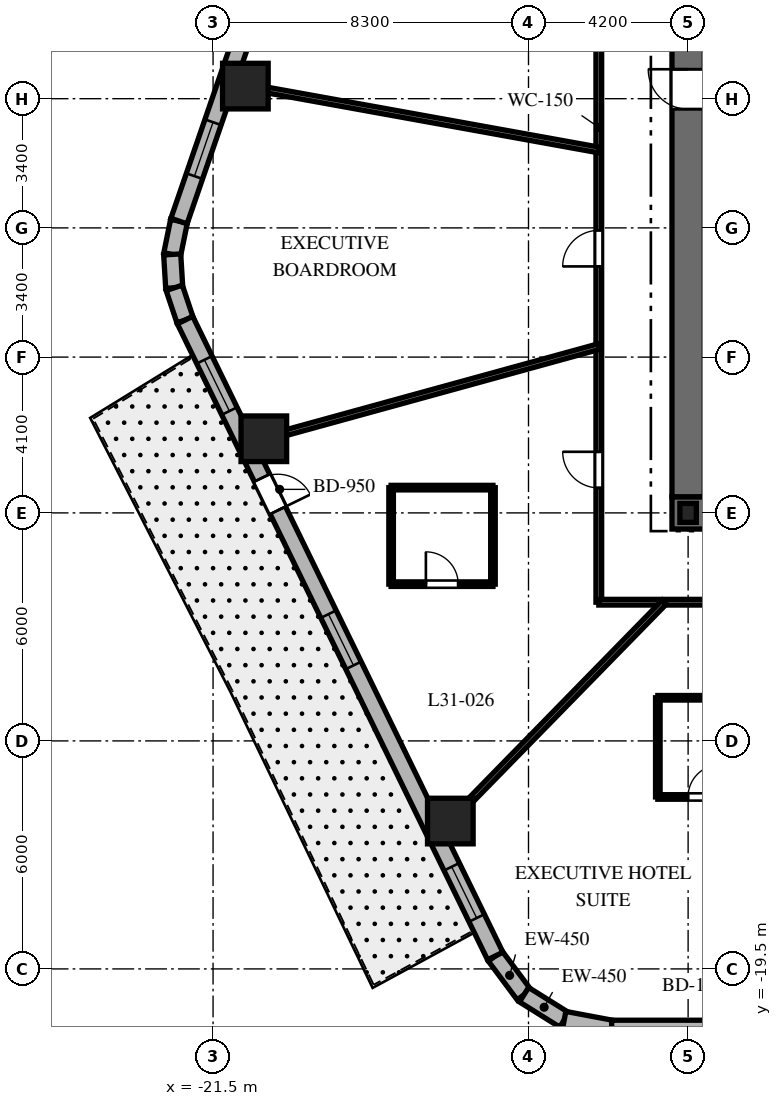
"""IFC4 building model, lengths in metres.
Left out: names, types, materials, properties, quantities, classifications, styles, units other than length and angle.
Written with IfcOpenShell. Run it as: python <this file> out.ifc"""

import sys

from ifc_helpers import new_model, si_unit, direction, frame, frame_2d, origin, origin_2d, place, context, subcontext, project, spatial, rectangle, i_section, extrude, element, fill, save


model = new_model("IFC4")
c1 = context("Model", 3, precision=1e-05, world=origin(), true_north=direction((0.0, 1.0)))
c2 = subcontext(c1, "Body", "Model", "MODEL_VIEW")
j1 = project(units=[si_unit("LENGTHUNIT", "METRE"), si_unit("PLANEANGLEUNIT", "RADIAN")], contexts=[c1])
p1 = place(None, origin())
s1 = spatial("IfcSite", under=j1, at=p1, CompositionType="ELEMENT")
p2 = place(p1, origin())
s2 = spatial("IfcBuilding", under=s1, at=p2, CompositionType="ELEMENT")
p3 = place(p2, frame((0.0, 0.0, 128.4)))
s3 = spatial("IfcBuildingStorey", under=s2, at=p3, CompositionType="ELEMENT", Elevation=128.4)
p4 = place(p3, frame((-9.425, -7.5, 0.0), z_axis=(0.0, 0.0, 1.0), x_axis=(1.0, 0.0, 0.0)))
e1 = element("IfcWall", 1, at=p4, inside=s3, PredefinedType="SHEAR", context=c2, shape_type="SweptSolid", body=[
    extrude(rectangle(XDim=18.85, YDim=0.85, at=frame_2d((9.425, 0.0))), origin(), (0.0, 0.0, 1.0), 3.7),
])
p5 = place(p4, frame((9.475, 0.0, 0.0)))
e2 = element("IfcOpeningElement", 2, at=p5, cuts=e1, PredefinedType="OPENING", context=c2, shape_type="SweptSolid", body=[
    extrude(rectangle(XDim=1.0, YDim=2.15, at=frame_2d((0.5, 1.075))), frame((0.0, 0.435, 0.0), z_axis=(0.0, -1.0, 0.0), x_axis=(1.0, 0.0, 0.0)), (0.0, 0.0, 1.0), 0.87),
])
p6 = place(p3, frame((-9.0, -7.075, 0.0), z_axis=(0.0, 0.0, 1.0), x_axis=(0.0, 1.0, 0.0)))
e3 = element("IfcWall", 3, at=p6, inside=s3, PredefinedType="SHEAR", context=c2, shape_type="SweptSolid", body=[
    extrude(rectangle(XDim=14.15, YDim=0.85, at=frame_2d((7.075, 0.0))), origin(), (0.0, 0.0, 1.0), 3.7),
])
p7 = place(p6, frame((10.2, 0.0, 0.0)))
e4 = element("IfcOpeningElement", 4, at=p7, cuts=e3, PredefinedType="OPENING", context=c2, shape_type="SweptSolid", body=[
    extrude(rectangle(XDim=1.05, YDim=2.15, at=frame_2d((0.525, 1.075))), frame((0.0, 0.435, 0.0), z_axis=(0.0, -1.0, 0.0), x_axis=(1.0, 0.0, 0.0)), (0.0, 0.0, 1.0), 0.87),
])
p8 = place(p3, frame((-9.0, -7.5, 0.0), z_axis=(0.0, 0.0, 1.0), x_axis=(1.0, 0.0, 0.0)))
e5 = element("IfcColumn", 5, at=p8, inside=s3, PredefinedType="COLUMN", context=c2, shape_type="SweptSolid", body=[
    extrude(i_section(OverallWidth=0.432, OverallDepth=0.498, WebThickness=0.056, FlangeThickness=0.089, at=origin_2d()), origin(), (0.0, 0.0, 1.0), 3.7),
])
for number, where, z_axis, x_axis in (
    (6, (-20.65, 3.731, 0.0), (0.0, 0.0, 1.0), (1.0, 0.0, 0.0)),
    (7, (-20.164, -5.549, 0.0), (0.0, 0.0, 1.0), (1.0, 0.0, 0.0)),
    (8, (-15.257, -15.609, 0.0), (0.0, 0.0, 1.0), (1.0, 0.0, 0.0)),
):
    element("IfcColumn", number, at=place(p3, frame(where, z_axis=z_axis, x_axis=x_axis)), inside=s3, PredefinedType="COLUMN", context=c2, shape_type="SweptSolid", body=[
        extrude(rectangle(XDim=1.2, YDim=1.2, at=origin_2d()), origin(), (0.0, 0.0, 1.0), 3.7),
    ])
p9 = place(p3, frame((-14.076, -19.161, 0.0), z_axis=(0.0, 0.0, 1.0), x_axis=(0.597226657159, -0.802072515412, 0.0)))
e9 = element("IfcWall", 9, at=p9, inside=s3, PredefinedType="SOLIDWALL", context=c2, shape_type="SweptSolid", body=[
    extrude(rectangle(XDim=1.269, YDim=0.45, at=frame_2d((0.635, 0.0))), origin(), (0.0, 0.0, 1.0), 3.4),
])
p10 = place(p3, frame((-13.318, -20.179, 0.0), z_axis=(0.0, 0.0, 1.0), x_axis=(0.848031272749, -0.529946186362, 0.0)))
e10 = element("IfcWall", 10, at=p10, inside=s3, PredefinedType="SOLIDWALL", context=c2, shape_type="SweptSolid", body=[
    extrude(rectangle(XDim=1.248, YDim=0.45, at=frame_2d((0.624, 0.0))), origin(), (0.0, 0.0, 1.0), 3.4),
])
p11 = place(p3, frame((-12.259, -20.84, 0.0), z_axis=(0.0, 0.0, 1.0), x_axis=(0.982730354425, -0.185043374624, 0.0)))
e11 = element("IfcWall", 11, at=p11, inside=s3, PredefinedType="SOLIDWALL", context=c2, shape_type="SweptSolid", body=[
    extrude(rectangle(XDim=1.269, YDim=0.45, at=frame_2d((0.635, 0.0))), origin(), (0.0, 0.0, 1.0), 3.4),
])
p12 = place(p3, frame((-22.397, 0.179, 0.0), z_axis=(0.0, 0.0, 1.0), x_axis=(-0.199313589404, -0.979935759669, 0.0)))
e12 = element("IfcWall", 12, at=p12, inside=s3, PredefinedType="SOLIDWALL", context=c2, shape_type="SweptSolid", body=[
    extrude(rectangle(XDim=0.896, YDim=0.45, at=frame_2d((0.448, 0.0))), origin(), (0.0, 0.0, 1.0), 3.4),
])
p13 = place(p3, frame((-22.575, -0.698, 0.0), z_axis=(0.0, 0.0, 1.0), x_axis=(0.060980441946, -0.998138961117, 0.0)))
e13 = element("IfcWall", 13, at=p13, inside=s3, PredefinedType="SOLIDWALL", context=c2, shape_type="SweptSolid", body=[
    extrude(rectangle(XDim=0.881, YDim=0.45, at=frame_2d((0.44, 0.0))), origin(), (0.0, 0.0, 1.0), 3.4),
])
p14 = place(p3, frame((-22.522, -1.577, 0.0), z_axis=(0.0, 0.0, 1.0), x_axis=(0.317372694837, -0.948300887151, 0.0)))
e14 = element("IfcWall", 14, at=p14, inside=s3, PredefinedType="SOLIDWALL", context=c2, shape_type="SweptSolid", body=[
    extrude(rectangle(XDim=0.896, YDim=0.45, at=frame_2d((0.448, 0.0))), origin(), (0.0, 0.0, 1.0), 3.4),
])
p15 = place(p3, frame((-11.012, -21.075, 0.0), z_axis=(0.0, 0.0, 1.0), x_axis=(1.0, 0.0, 0.0)))
e15 = element("IfcWall", 15, at=p15, inside=s3, PredefinedType="SOLIDWALL", context=c2, shape_type="SweptSolid", body=[
    extrude(rectangle(XDim=23.782, YDim=0.45, at=frame_2d((11.891, 0.0))), origin(), (0.0, 0.0, 1.0), 3.4),
])
p16 = place(p15, frame((2.473, 0.0, 0.0)))
e16 = element("IfcOpeningElement", 16, at=p16, cuts=e15, PredefinedType="OPENING", context=c2, shape_type="SweptSolid", body=[
    extrude(rectangle(XDim=1.0, YDim=2.15, at=frame_2d((0.5, 1.075))), frame((0.0, 0.235, 0.0), z_axis=(0.0, -1.0, 0.0), x_axis=(1.0, 0.0, 0.0)), (0.0, 0.0, 1.0), 0.47),
])
p17 = place(p15, frame((11.142, 0.0, 0.8)))
e17 = element("IfcOpeningElement", 17, at=p17, cuts=e15, PredefinedType="OPENING", context=c2, shape_type="SweptSolid", body=[
    extrude(rectangle(XDim=1.5, YDim=1.8, at=frame_2d((0.75, 0.9))), frame((0.0, 0.235, 0.0), z_axis=(0.0, -1.0, 0.0), x_axis=(1.0, 0.0, 0.0)), (0.0, 0.0, 1.0), 0.47),
])
p18 = place(p15, frame((20.741, 0.0, 0.8)))
e18 = element("IfcOpeningElement", 18, at=p18, cuts=e15, PredefinedType="OPENING", context=c2, shape_type="SweptSolid", body=[
    extrude(rectangle(XDim=1.5, YDim=1.8, at=frame_2d((0.75, 0.9))), frame((0.0, 0.235, 0.0), z_axis=(0.0, -1.0, 0.0), x_axis=(1.0, 0.0, 0.0)), (0.0, 0.0, 1.0), 0.47),
])
p19 = place(p3, frame((-15.992, 18.777, 0.0), z_axis=(0.0, 0.0, 1.0), x_axis=(-0.325606988926, -0.945505202927, 0.0)))
e19 = element("IfcWall", 19, at=p19, inside=s3, PredefinedType="SOLIDWALL", context=c2, shape_type="SweptSolid", body=[
    extrude(rectangle(XDim=19.669, YDim=0.45, at=frame_2d((9.835, 0.0))), origin(), (0.0, 0.0, 1.0), 3.4),
])
p20 = place(p19, frame((1.197, 0.0, 0.8)))
e20 = element("IfcOpeningElement", 20, at=p20, cuts=e19, PredefinedType="OPENING", context=c2, shape_type="SweptSolid", body=[
    extrude(rectangle(XDim=1.5, YDim=1.8, at=frame_2d((0.75, 0.9))), frame((0.0, 0.235, 0.0), z_axis=(0.0, -1.0, 0.0), x_axis=(1.0, 0.0, 0.0)), (0.0, 0.0, 1.0), 0.47),
])
p21 = place(p19, frame((9.03, 0.0, 0.8)))
e21 = element("IfcOpeningElement", 21, at=p21, cuts=e19, PredefinedType="OPENING", context=c2, shape_type="SweptSolid", body=[
    extrude(rectangle(XDim=1.5, YDim=1.8, at=frame_2d((0.75, 0.9))), frame((0.0, 0.235, 0.0), z_axis=(0.0, -1.0, 0.0), x_axis=(1.0, 0.0, 0.0)), (0.0, 0.0, 1.0), 0.47),
])
p22 = place(p19, frame((16.918, 0.0, 0.8)))
e22 = element("IfcOpeningElement", 22, at=p22, cuts=e19, PredefinedType="OPENING", context=c2, shape_type="SweptSolid", body=[
    extrude(rectangle(XDim=1.5, YDim=1.8, at=frame_2d((0.75, 0.9))), frame((0.0, 0.235, 0.0), z_axis=(0.0, -1.0, 0.0), x_axis=(1.0, 0.0, 0.0)), (0.0, 0.0, 1.0), 0.47),
])
p23 = place(p3, frame((-22.238, -2.427, 0.0), z_axis=(0.0, 0.0, 1.0), x_axis=(0.438374803278, -0.898792262901, 0.0)))
e23 = element("IfcWall", 23, at=p23, inside=s3, PredefinedType="SOLIDWALL", context=c2, shape_type="SweptSolid", body=[
    extrude(rectangle(XDim=18.618, YDim=0.45, at=frame_2d((9.309, 0.0))), origin(), (0.0, 0.0, 1.0), 3.4),
])
p24 = place(p23, frame((4.62, 0.0, 0.0)))
e24 = element("IfcOpeningElement", 24, at=p24, cuts=e23, PredefinedType="OPENING", context=c2, shape_type="SweptSolid", body=[
    extrude(rectangle(XDim=0.95, YDim=2.15, at=frame_2d((0.475, 1.075))), frame((0.0, 0.235, 0.0), z_axis=(0.0, -1.0, 0.0), x_axis=(1.0, 0.0, 0.0)), (0.0, 0.0, 1.0), 0.47),
])
p25 = place(p23, frame((1.163, 0.0, 0.8)))
e25 = element("IfcOpeningElement", 25, at=p25, cuts=e23, PredefinedType="OPENING", context=c2, shape_type="SweptSolid", body=[
    extrude(rectangle(XDim=1.5, YDim=1.8, at=frame_2d((0.75, 0.9))), frame((0.0, 0.235, 0.0), z_axis=(0.0, -1.0, 0.0), x_axis=(1.0, 0.0, 0.0)), (0.0, 0.0, 1.0), 0.47),
])
p26 = place(p23, frame((8.61, 0.0, 0.8)))
e26 = element("IfcOpeningElement", 26, at=p26, cuts=e23, PredefinedType="OPENING", context=c2, shape_type="SweptSolid", body=[
    extrude(rectangle(XDim=1.5, YDim=1.8, at=frame_2d((0.75, 0.9))), frame((0.0, 0.235, 0.0), z_axis=(0.0, -1.0, 0.0), x_axis=(1.0, 0.0, 0.0)), (0.0, 0.0, 1.0), 0.47),
])
p27 = place(p23, frame((16.006, 0.0, 0.8)))
e27 = element("IfcOpeningElement", 27, at=p27, cuts=e23, PredefinedType="OPENING", context=c2, shape_type="SweptSolid", body=[
    extrude(rectangle(XDim=1.5, YDim=1.8, at=frame_2d((0.75, 0.9))), frame((0.0, 0.235, 0.0), z_axis=(0.0, -1.0, 0.0), x_axis=(1.0, 0.0, 0.0)), (0.0, 0.0, 1.0), 0.47),
])
p28 = place(p3, frame((-11.35, -9.85, 0.0), z_axis=(0.0, 0.0, 1.0), x_axis=(0.0, 1.0, 0.0)))
e28 = element("IfcWall", 28, at=p28, inside=s3, PredefinedType="PARTITIONING", context=c2, shape_type="SweptSolid", body=[
    extrude(rectangle(XDim=19.7, YDim=0.15, at=frame_2d((9.85, 0.0))), origin(), (0.0, 0.0, 1.0), 2.84),
])
p29 = place(p28, frame((15.205, 0.0, 0.0)))
e29 = element("IfcOpeningElement", 29, at=p29, cuts=e28, PredefinedType="OPENING", context=c2, shape_type="SweptSolid", body=[
    extrude(rectangle(XDim=0.95, YDim=2.03, at=frame_2d((0.475, 1.015))), frame((0.0, 0.085, 0.0), z_axis=(0.0, -1.0, 0.0), x_axis=(1.0, 0.0, 0.0)), (0.0, 0.0, 1.0), 0.17),
])
p30 = place(p28, frame((8.836, 0.0, 0.0)))
e30 = element("IfcOpeningElement", 30, at=p30, cuts=e28, PredefinedType="OPENING", context=c2, shape_type="SweptSolid", body=[
    extrude(rectangle(XDim=0.95, YDim=2.03, at=frame_2d((0.475, 1.015))), frame((0.0, 0.085, 0.0), z_axis=(0.0, -1.0, 0.0), x_axis=(1.0, 0.0, 0.0)), (0.0, 0.0, 1.0), 0.17),
])
p31 = place(p28, frame((3.008, 0.0, 0.0)))
e31 = element("IfcOpeningElement", 31, at=p31, cuts=e28, PredefinedType="OPENING", context=c2, shape_type="SweptSolid", body=[
    extrude(rectangle(XDim=0.95, YDim=2.03, at=frame_2d((0.475, 1.015))), frame((0.0, 0.085, 0.0), z_axis=(0.0, -1.0, 0.0), x_axis=(1.0, 0.0, 0.0)), (0.0, 0.0, 1.0), 0.17),
])
p32 = place(p3, frame((11.35, -9.85, 0.0), z_axis=(0.0, 0.0, 1.0), x_axis=(-1.0, 0.0, 0.0)))
e32 = element("IfcWall", 32, at=p32, inside=s3, PredefinedType="PARTITIONING", context=c2, shape_type="SweptSolid", body=[
    extrude(rectangle(XDim=22.7, YDim=0.15, at=frame_2d((11.35, 0.0))), origin(), (0.0, 0.0, 1.0), 2.84),
])
p33 = place(p32, frame((17.237, 0.0, 0.0)))
e33 = element("IfcOpeningElement", 33, at=p33, cuts=e32, PredefinedType="OPENING", context=c2, shape_type="SweptSolid", body=[
    extrude(rectangle(XDim=0.95, YDim=2.03, at=frame_2d((0.475, 1.015))), frame((0.0, 0.085, 0.0), z_axis=(0.0, -1.0, 0.0), x_axis=(1.0, 0.0, 0.0)), (0.0, 0.0, 1.0), 0.17),
])
p34 = place(p32, frame((10.45, 0.0, 0.0)))
e34 = element("IfcOpeningElement", 34, at=p34, cuts=e32, PredefinedType="OPENING", context=c2, shape_type="SweptSolid", body=[
    extrude(rectangle(XDim=0.95, YDim=2.03, at=frame_2d((0.475, 1.015))), frame((0.0, 0.085, 0.0), z_axis=(0.0, -1.0, 0.0), x_axis=(1.0, 0.0, 0.0)), (0.0, 0.0, 1.0), 0.17),
])
p35 = place(p32, frame((3.399, 0.0, 0.0)))
e35 = element("IfcOpeningElement", 35, at=p35, cuts=e32, PredefinedType="OPENING", context=c2, shape_type="SweptSolid", body=[
    extrude(rectangle(XDim=0.95, YDim=2.03, at=frame_2d((0.475, 1.015))), frame((0.0, 0.085, 0.0), z_axis=(0.0, -1.0, 0.0), x_axis=(1.0, 0.0, 0.0)), (0.0, 0.0, 1.0), 0.17),
])
p36 = place(p3, frame((-11.35, 2.051, 0.0), z_axis=(0.0, 0.0, 1.0), x_axis=(-0.984068313063, 0.177790762484, 0.0)))
e36 = element("IfcWall", 36, at=p36, inside=s3, PredefinedType="PARTITIONING", context=c2, shape_type="SweptSolid", body=[
    extrude(rectangle(XDim=9.951, YDim=0.15, at=frame_2d((4.976, 0.0))), origin(), (0.0, 0.0, 1.0), 2.54),
])
p37 = place(p3, frame((-11.35, -3.123, 0.0), z_axis=(0.0, 0.0, 1.0), x_axis=(-0.964151983214, -0.265350623261, 0.0)))
e37 = element("IfcWall", 37, at=p37, inside=s3, PredefinedType="PARTITIONING", context=c2, shape_type="SweptSolid", body=[
    extrude(rectangle(XDim=9.645, YDim=0.15, at=frame_2d((4.823, 0.0))), origin(), (0.0, 0.0, 1.0), 2.54),
])
p38 = place(p3, frame((-9.628, -9.85, 0.0), z_axis=(0.0, 0.0, 1.0), x_axis=(-0.698992824326, -0.715128681805, 0.0)))
e38 = element("IfcWall", 38, at=p38, inside=s3, PredefinedType="PARTITIONING", context=c2, shape_type="SweptSolid", body=[
    extrude(rectangle(XDim=8.579, YDim=0.15, at=frame_2d((4.29, 0.0))), origin(), (0.0, 0.0, 1.0), 2.54),
])
p39 = place(p3, frame((-16.815, -9.375, 0.0), z_axis=(0.0, 0.0, 1.0), x_axis=(1.0, 0.0, 0.0)))
e39 = element("IfcWall", 39, at=p39, inside=s3, PredefinedType="PARTITIONING", context=c2, shape_type="SweptSolid", body=[
    extrude(rectangle(XDim=2.68, YDim=0.12, at=frame_2d((1.34, 0.0))), origin(), (0.0, 0.0, 1.0), 2.927),
])
p40 = place(p39, frame((0.915, 0.0, 0.0)))
e40 = element("IfcOpeningElement", 40, at=p40, cuts=e39, PredefinedType="OPENING", context=c2, shape_type="SweptSolid", body=[
    extrude(rectangle(XDim=0.85, YDim=2.03, at=frame_2d((0.425, 1.015))), frame((0.0, 0.07, 0.0), z_axis=(0.0, -1.0, 0.0), x_axis=(1.0, 0.0, 0.0)), (0.0, 0.0, 1.0), 0.14),
])
p41 = place(p3, frame((-14.135, -9.375, 0.0), z_axis=(0.0, 0.0, 1.0), x_axis=(0.0, 1.0, 0.0)))
e41 = element("IfcWall", 41, at=p41, inside=s3, PredefinedType="PARTITIONING", context=c2, shape_type="SweptSolid", body=[
    extrude(rectangle(XDim=2.54, YDim=0.12, at=frame_2d((1.27, 0.0))), origin(), (0.0, 0.0, 1.0), 3.4),
])
p42 = place(p3, frame((-14.135, -6.835, 0.0), z_axis=(0.0, 0.0, 1.0), x_axis=(-1.0, 0.0, 0.0)))
e42 = element("IfcWall", 42, at=p42, inside=s3, PredefinedType="PARTITIONING", context=c2, shape_type="SweptSolid", body=[
    extrude(rectangle(XDim=2.68, YDim=0.12, at=frame_2d((1.34, 0.0))), origin(), (0.0, 0.0, 1.0), 2.927),
])
p43 = place(p3, frame((-16.815, -6.835, 0.0), z_axis=(0.0, 0.0, 1.0), x_axis=(0.0, -1.0, 0.0)))
e43 = element("IfcWall", 43, at=p43, inside=s3, PredefinedType="PARTITIONING", context=c2, shape_type="SweptSolid", body=[
    extrude(rectangle(XDim=2.54, YDim=0.12, at=frame_2d((1.27, 0.0))), origin(), (0.0, 0.0, 1.0), 3.4),
])
p44 = place(p3, frame((-9.797, -14.975, 0.0), z_axis=(0.0, 0.0, 1.0), x_axis=(1.0, 0.0, 0.0)))
e44 = element("IfcWall", 44, at=p44, inside=s3, PredefinedType="PARTITIONING", context=c2, shape_type="SweptSolid", body=[
    extrude(rectangle(XDim=2.44, YDim=0.12, at=frame_2d((1.22, 0.0))), origin(), (0.0, 0.0, 1.0), 2.972),
])
p45 = place(p44, frame((0.795, 0.0, 0.0)))
e45 = element("IfcOpeningElement", 45, at=p45, cuts=e44, PredefinedType="OPENING", context=c2, shape_type="SweptSolid", body=[
    extrude(rectangle(XDim=0.85, YDim=2.03, at=frame_2d((0.425, 1.015))), frame((0.0, 0.07, 0.0), z_axis=(0.0, -1.0, 0.0), x_axis=(1.0, 0.0, 0.0)), (0.0, 0.0, 1.0), 0.14),
])
p46 = place(p3, frame((-7.357, -12.365, 0.0), z_axis=(0.0, 0.0, 1.0), x_axis=(-1.0, 0.0, 0.0)))
e46 = element("IfcWall", 46, at=p46, inside=s3, PredefinedType="PARTITIONING", context=c2, shape_type="SweptSolid", body=[
    extrude(rectangle(XDim=2.44, YDim=0.12, at=frame_2d((1.22, 0.0))), origin(), (0.0, 0.0, 1.0), 2.841),
])
p47 = place(p3, frame((-9.797, -12.365, 0.0), z_axis=(0.0, 0.0, 1.0), x_axis=(0.0, -1.0, 0.0)))
e47 = element("IfcWall", 47, at=p47, inside=s3, PredefinedType="PARTITIONING", context=c2, shape_type="SweptSolid", body=[
    extrude(rectangle(XDim=2.61, YDim=0.12, at=frame_2d((1.305, 0.0))), origin(), (0.0, 0.0, 1.0), 2.972),
])
p48 = place(p22, origin())
e48 = element("IfcWindow", 48, at=p48, inside=s3, PartitioningType="SINGLE_PANEL", PredefinedType="WINDOW", context=c2, shape_type="SweptSolid", body=[
    extrude(rectangle(XDim=1.5, YDim=1.8, at=frame_2d((0.75, 0.9))), frame((0.0, 0.03, 0.0), z_axis=(0.0, -1.0, 0.0), x_axis=(1.0, 0.0, 0.0)), (0.0, 0.0, 1.0), 0.06),
])
fill(e22, e48)
p49 = place(p24, origin())
e49 = element("IfcDoor", 49, at=p49, inside=s3, OperationType="SINGLE_SWING_RIGHT", PredefinedType="DOOR", context=c2, shape_type="SweptSolid", body=[
    extrude(rectangle(XDim=0.95, YDim=2.15, at=frame_2d((0.475, 1.075))), frame((0.0, 0.025, 0.0), z_axis=(0.0, -1.0, 0.0), x_axis=(1.0, 0.0, 0.0)), (0.0, 0.0, 1.0), 0.05),
])
fill(e24, e49)
p50 = place(p25, origin())
e50 = element("IfcWindow", 50, at=p50, inside=s3, PartitioningType="SINGLE_PANEL", PredefinedType="WINDOW", context=c2, shape_type="SweptSolid", body=[
    extrude(rectangle(XDim=1.5, YDim=1.8, at=frame_2d((0.75, 0.9))), frame((0.0, 0.03, 0.0), z_axis=(0.0, -1.0, 0.0), x_axis=(1.0, 0.0, 0.0)), (0.0, 0.0, 1.0), 0.06),
])
fill(e25, e50)
p51 = place(p26, origin())
e51 = element("IfcWindow", 51, at=p51, inside=s3, PartitioningType="SINGLE_PANEL", PredefinedType="WINDOW", context=c2, shape_type="SweptSolid", body=[
    extrude(rectangle(XDim=1.5, YDim=1.8, at=frame_2d((0.75, 0.9))), frame((0.0, 0.03, 0.0), z_axis=(0.0, -1.0, 0.0), x_axis=(1.0, 0.0, 0.0)), (0.0, 0.0, 1.0), 0.06),
])
fill(e26, e51)
p52 = place(p27, origin())
e52 = element("IfcWindow", 52, at=p52, inside=s3, PartitioningType="SINGLE_PANEL", PredefinedType="WINDOW", context=c2, shape_type="SweptSolid", body=[
    extrude(rectangle(XDim=1.5, YDim=1.8, at=frame_2d((0.75, 0.9))), frame((0.0, 0.03, 0.0), z_axis=(0.0, -1.0, 0.0), x_axis=(1.0, 0.0, 0.0)), (0.0, 0.0, 1.0), 0.06),
])
fill(e27, e52)
p53 = place(p7, origin())
e53 = element("IfcDoor", 53, at=p53, inside=s3, OperationType="SINGLE_SWING_RIGHT", PredefinedType="DOOR", context=c2, shape_type="SweptSolid", body=[
    extrude(rectangle(XDim=1.05, YDim=2.15, at=frame_2d((0.525, 1.075))), frame((0.0, 0.025, 0.0), z_axis=(0.0, -1.0, 0.0), x_axis=(1.0, 0.0, 0.0)), (0.0, 0.0, 1.0), 0.05),
])
fill(e4, e53)
p54 = place(p30, origin())
e54 = element("IfcDoor", 54, at=p54, inside=s3, OperationType="SINGLE_SWING_LEFT", PredefinedType="DOOR", context=c2, shape_type="SweptSolid", body=[
    extrude(rectangle(XDim=0.95, YDim=2.03, at=frame_2d((0.475, 1.015))), frame((0.0, 0.025, 0.0), z_axis=(0.0, -1.0, 0.0), x_axis=(1.0, 0.0, 0.0)), (0.0, 0.0, 1.0), 0.05),
])
fill(e30, e54)
p55 = place(p31, origin())
e55 = element("IfcDoor", 55, at=p55, inside=s3, OperationType="SINGLE_SWING_RIGHT", PredefinedType="DOOR", context=c2, shape_type="SweptSolid", body=[
    extrude(rectangle(XDim=0.95, YDim=2.03, at=frame_2d((0.475, 1.015))), frame((0.0, 0.025, 0.0), z_axis=(0.0, -1.0, 0.0), x_axis=(1.0, 0.0, 0.0)), (0.0, 0.0, 1.0), 0.05),
])
fill(e31, e55)
p56 = place(p40, origin())
e56 = element("IfcDoor", 56, at=p56, inside=s3, OperationType="SINGLE_SWING_LEFT", PredefinedType="DOOR", context=c2, shape_type="SweptSolid", body=[
    extrude(rectangle(XDim=0.85, YDim=2.03, at=frame_2d((0.425, 1.015))), frame((0.0, 0.025, 0.0), z_axis=(0.0, -1.0, 0.0), x_axis=(1.0, 0.0, 0.0)), (0.0, 0.0, 1.0), 0.05),
])
fill(e40, e56)
p57 = place(p45, origin())
e57 = element("IfcDoor", 57, at=p57, inside=s3, OperationType="SINGLE_SWING_RIGHT", PredefinedType="DOOR", context=c2, shape_type="SweptSolid", body=[
    extrude(rectangle(XDim=0.85, YDim=2.03, at=frame_2d((0.425, 1.015))), frame((0.0, 0.025, 0.0), z_axis=(0.0, -1.0, 0.0), x_axis=(1.0, 0.0, 0.0)), (0.0, 0.0, 1.0), 0.05),
])
fill(e45, e57)
save(model, sys.argv[1])
